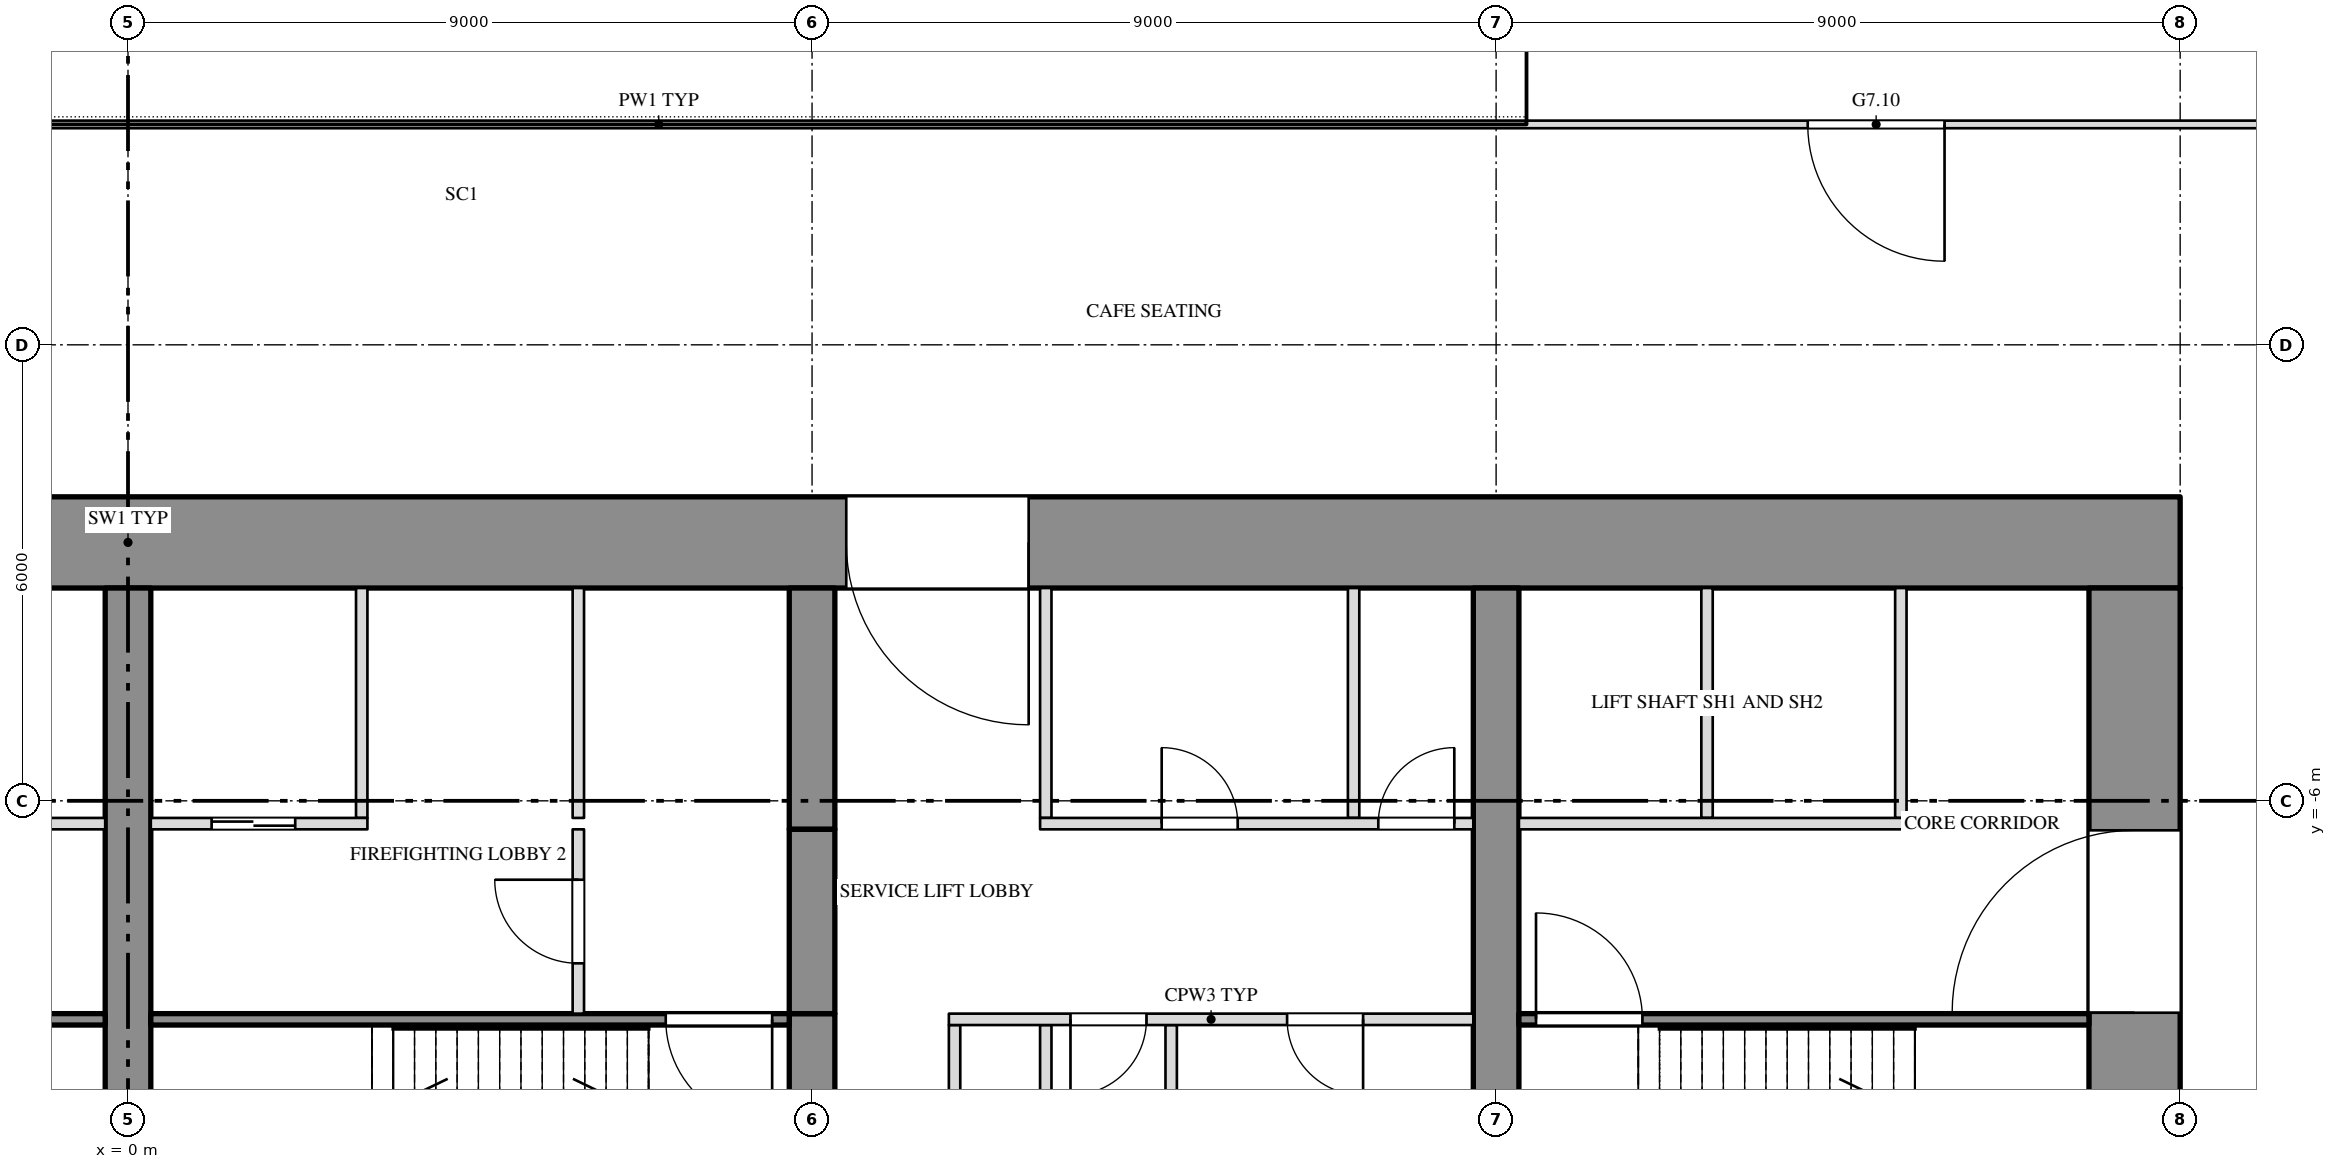
"""IFC4 building model, lengths in metres.
Left out: names, types, materials, properties, quantities, classifications, styles, units other than length and angle.
Written with IfcOpenShell. Run it as: python <this file> out.ifc"""

import sys

from ifc_helpers import new_model, si_unit, direction, frame, frame_2d, origin, place, context, subcontext, project, spatial, rectangle, extrude, element, fill, save


model = new_model("IFC4")
c1 = context("Model", 3, precision=1e-05, world=origin(), true_north=direction((0.0, 1.0)))
c2 = subcontext(c1, "Body", "Model", "MODEL_VIEW")
j1 = project(units=[si_unit("LENGTHUNIT", "METRE"), si_unit("PLANEANGLEUNIT", "RADIAN")], contexts=[c1])
p1 = place(None, origin())
s1 = spatial("IfcSite", under=j1, at=p1, CompositionType="ELEMENT")
p2 = place(p1, origin())
s2 = spatial("IfcBuilding", under=s1, at=p2, CompositionType="ELEMENT")
p3 = place(p2, frame((0.0, 0.0, 43.5)))
s3 = spatial("IfcBuildingStorey", under=s2, at=p3, CompositionType="ELEMENT", Elevation=43.5)
p4 = place(p3, frame((-27.0, -2.6, 0.0), z_axis=(0.0, 0.0, 1.0), x_axis=(1.0, 0.0, 0.0)))
e1 = element("IfcWall", 1, at=p4, inside=s3, PredefinedType="SHEAR", context=c2, shape_type="SweptSolid", body=[
    extrude(rectangle(XDim=54.0, YDim=1.2, at=frame_2d((27.0, 0.0))), origin(), (0.0, 0.0, 1.0), 4.25),
])
p5 = place(p4, frame((15.15, 0.0, 0.0)))
e2 = element("IfcOpeningElement", 2, at=p5, cuts=e1, PredefinedType="OPENING", context=c2, shape_type="SweptSolid", body=[
    extrude(rectangle(XDim=2.4, YDim=2.1, at=frame_2d((1.2, 1.05))), frame((0.0, 0.612, 0.0), z_axis=(0.0, -1.0, 0.0), x_axis=(1.0, 0.0, 0.0)), (0.0, 0.0, 1.0), 1.224),
])
p6 = place(p4, frame((36.45, 0.0, 0.0)))
e3 = element("IfcOpeningElement", 3, at=p6, cuts=e1, PredefinedType="OPENING", context=c2, shape_type="SweptSolid", body=[
    extrude(rectangle(XDim=2.4, YDim=2.1, at=frame_2d((1.2, 1.05))), frame((0.0, 0.612, 0.0), z_axis=(0.0, -1.0, 0.0), x_axis=(1.0, 0.0, 0.0)), (0.0, 0.0, 1.0), 1.224),
])
p7 = place(p3, frame((26.4, -12.8, 0.0), z_axis=(0.0, 0.0, 1.0), x_axis=(0.0, 1.0, 0.0)))
e4 = element("IfcWall", 4, at=p7, inside=s3, PredefinedType="SHEAR", context=c2, shape_type="SweptSolid", body=[
    extrude(rectangle(XDim=9.6, YDim=1.2, at=frame_2d((4.8, 0.0))), origin(), (0.0, 0.0, 1.0), 4.25),
])
p8 = place(p7, frame((4.012, 0.0, 0.0)))
e5 = element("IfcOpeningElement", 5, at=p8, cuts=e4, PredefinedType="OPENING", context=c2, shape_type="SweptSolid", body=[
    extrude(rectangle(XDim=2.4, YDim=2.1, at=frame_2d((1.2, 1.05))), frame((0.0, 0.612, 0.0), z_axis=(0.0, -1.0, 0.0), x_axis=(1.0, 0.0, 0.0)), (0.0, 0.0, 1.0), 1.224),
])
p9 = place(p3, frame((0.0, -12.8, 0.0), z_axis=(0.0, 0.0, 1.0), x_axis=(0.0, 1.0, 0.0)))
e6 = element("IfcWall", 6, at=p9, inside=s3, PredefinedType="SHEAR", context=c2, shape_type="SweptSolid", body=[
    extrude(rectangle(XDim=9.6, YDim=0.6, at=frame_2d((4.8, 0.0))), origin(), (0.0, 0.0, 1.0), 4.25),
])
p10 = place(p3, frame((9.0, -12.8, 0.0), z_axis=(0.0, 0.0, 1.0), x_axis=(0.0, 1.0, 0.0)))
e7 = element("IfcWall", 7, at=p10, inside=s3, PredefinedType="SHEAR", context=c2, shape_type="SweptSolid", body=[
    extrude(rectangle(XDim=4.0, YDim=0.6, at=frame_2d((2.0, 0.0))), origin(), (0.0, 0.0, 1.0), 4.25),
])
p11 = place(p3, frame((9.0, -6.375, 0.0), z_axis=(0.0, 0.0, 1.0), x_axis=(0.0, 1.0, 0.0)))
e8 = element("IfcWall", 8, at=p11, inside=s3, PredefinedType="SHEAR", context=c2, shape_type="SweptSolid", body=[
    extrude(rectangle(XDim=3.175, YDim=0.6, at=frame_2d((1.587, 0.0))), origin(), (0.0, 0.0, 1.0), 4.25),
])
p12 = place(p3, frame((9.0, -8.8, 3.6), z_axis=(0.0, 0.0, 1.0), x_axis=(0.0, 1.0, 0.0)))
e9 = element("IfcWall", 9, at=p12, inside=s3, PredefinedType="SHEAR", context=c2, shape_type="SweptSolid", body=[
    extrude(rectangle(XDim=2.425, YDim=0.6, at=frame_2d((1.212, 0.0))), origin(), (0.0, 0.0, 1.0), 0.65),
])
p13 = place(p3, frame((18.0, -12.8, 0.0), z_axis=(0.0, 0.0, 1.0), x_axis=(0.0, 1.0, 0.0)))
e10 = element("IfcWall", 10, at=p13, inside=s3, PredefinedType="SHEAR", context=c2, shape_type="SweptSolid", body=[
    extrude(rectangle(XDim=9.6, YDim=0.6, at=frame_2d((4.8, 0.0))), origin(), (0.0, 0.0, 1.0), 4.25),
])
p14 = place(p3, frame((-18.55, 2.9, 0.0), z_axis=(0.0, 0.0, 1.0), x_axis=(1.0, 0.0, 0.0)))
e11 = element("IfcWall", 11, at=p14, inside=s3, PredefinedType="PARTITIONING", context=c2, shape_type="SweptSolid", body=[
    extrude(rectangle(XDim=51.066, YDim=0.1, at=frame_2d((25.533, 0.0))), origin(), (0.0, 0.0, 1.0), 4.25),
])
p15 = place(p14, frame((40.65, 0.0, 0.0)))
e12 = element("IfcOpeningElement", 12, at=p15, cuts=e11, PredefinedType="OPENING", context=c2, shape_type="SweptSolid", body=[
    extrude(rectangle(XDim=1.8, YDim=2.1, at=frame_2d((0.9, 1.05))), frame((0.0, 0.062, 0.0), z_axis=(0.0, -1.0, 0.0), x_axis=(1.0, 0.0, 0.0)), (0.0, 0.0, 1.0), 0.124),
])
p16 = place(p14, frame((47.55, 0.0, 0.0)))
e13 = element("IfcOpeningElement", 13, at=p16, cuts=e11, PredefinedType="OPENING", context=c2, shape_type="SweptSolid", body=[
    extrude(rectangle(XDim=1.0, YDim=2.1, at=frame_2d((0.5, 1.05))), frame((0.0, 0.062, 0.0), z_axis=(0.0, -1.0, 0.0), x_axis=(1.0, 0.0, 0.0)), (0.0, 0.0, 1.0), 0.124),
])
for number, where, z_axis, x_axis in (
    (14, (3.075, -6.225, 0.0), (0.0, 0.0, 1.0), (0.0, 1.0, 0.0)),
    (15, (5.925, -6.225, 0.0), (0.0, 0.0, 1.0), (0.0, 1.0, 0.0)),
    (16, (12.075, -6.225, 0.0), (0.0, 0.0, 1.0), (0.0, 1.0, 0.0)),
    (17, (16.125, -6.225, 0.0), (0.0, 0.0, 1.0), (0.0, 1.0, 0.0)),
    (18, (20.775, -6.225, 0.0), (0.0, 0.0, 1.0), (0.0, 1.0, 0.0)),
    (19, (23.325, -6.225, 0.0), (0.0, 0.0, 1.0), (0.0, 1.0, 0.0)),
):
    element("IfcWall", number, at=place(p3, frame(where, z_axis=z_axis, x_axis=x_axis)), inside=s3, PredefinedType="PARTITIONING", context=c2, shape_type="SweptSolid", body=[
        extrude(rectangle(XDim=3.025, YDim=0.15, at=frame_2d((1.513, 0.0))), origin(), (0.0, 0.0, 1.0), 4.25),
    ])
p17 = place(p3, frame((10.875, -12.8, 0.0), z_axis=(0.0, 0.0, 1.0), x_axis=(0.0, 1.0, 0.0)))
e20 = element("IfcWall", 20, at=p17, inside=s3, PredefinedType="PARTITIONING", context=c2, shape_type="SweptSolid", body=[
    extrude(rectangle(XDim=3.85, YDim=0.15, at=frame_2d((1.925, 0.0))), origin(), (0.0, 0.0, 1.0), 4.25),
])
p18 = place(p17, frame((1.475, 0.0, 0.0)))
e21 = element("IfcOpeningElement", 21, at=p18, cuts=e20, PredefinedType="OPENING", context=c2, shape_type="SweptSolid", body=[
    extrude(rectangle(XDim=0.9, YDim=2.1, at=frame_2d((0.45, 1.05))), frame((0.0, 0.087, 0.0), z_axis=(0.0, -1.0, 0.0), x_axis=(1.0, 0.0, 0.0)), (0.0, 0.0, 1.0), 0.174),
])
for number, where, z_axis, x_axis in (
    (22, (12.075, -12.8, 0.0), (0.0, 0.0, 1.0), (0.0, 1.0, 0.0)),
    (23, (13.725, -12.8, 0.0), (0.0, 0.0, 1.0), (0.0, 1.0, 0.0)),
):
    element("IfcWall", number, at=place(p3, frame(where, z_axis=z_axis, x_axis=x_axis)), inside=s3, PredefinedType="PARTITIONING", context=c2, shape_type="SweptSolid", body=[
        extrude(rectangle(XDim=3.85, YDim=0.15, at=frame_2d((1.925, 0.0))), origin(), (0.0, 0.0, 1.0), 4.25),
    ])
p19 = place(p3, frame((5.925, -8.8, 0.0), z_axis=(0.0, 0.0, 1.0), x_axis=(0.0, 1.0, 0.0)))
e24 = element("IfcWall", 24, at=p19, inside=s3, PredefinedType="PARTITIONING", context=c2, shape_type="SweptSolid", body=[
    extrude(rectangle(XDim=2.425, YDim=0.15, at=frame_2d((1.212, 0.0))), origin(), (0.0, 0.0, 1.0), 4.25),
])
p20 = place(p19, frame((0.662, 0.0, 0.0)))
e25 = element("IfcOpeningElement", 25, at=p20, cuts=e24, PredefinedType="OPENING", context=c2, shape_type="SweptSolid", body=[
    extrude(rectangle(XDim=1.1, YDim=2.1, at=frame_2d((0.55, 1.05))), frame((0.0, 0.087, 0.0), z_axis=(0.0, -1.0, 0.0), x_axis=(1.0, 0.0, 0.0)), (0.0, 0.0, 1.0), 0.174),
])
p21 = place(p3, frame((-3.15, -6.3, 0.0), z_axis=(0.0, 0.0, 1.0), x_axis=(1.0, 0.0, 0.0)))
e26 = element("IfcWall", 26, at=p21, inside=s3, PredefinedType="PARTITIONING", context=c2, shape_type="SweptSolid", body=[
    extrude(rectangle(XDim=2.85, YDim=0.15, at=frame_2d((1.425, 0.0))), origin(), (0.0, 0.0, 1.0), 4.25),
])
p22 = place(p21, frame((0.95, 0.0, 0.0)))
e27 = element("IfcOpeningElement", 27, at=p22, cuts=e26, PredefinedType="OPENING", context=c2, shape_type="SweptSolid", body=[
    extrude(rectangle(XDim=1.1, YDim=2.1, at=frame_2d((0.55, 1.05))), frame((0.0, 0.087, 0.0), z_axis=(0.0, -1.0, 0.0), x_axis=(1.0, 0.0, 0.0)), (0.0, 0.0, 1.0), 0.174),
])
p23 = place(p3, frame((0.3, -6.3, 0.0), z_axis=(0.0, 0.0, 1.0), x_axis=(1.0, 0.0, 0.0)))
e28 = element("IfcWall", 28, at=p23, inside=s3, PredefinedType="PARTITIONING", context=c2, shape_type="SweptSolid", body=[
    extrude(rectangle(XDim=2.85, YDim=0.15, at=frame_2d((1.425, 0.0))), origin(), (0.0, 0.0, 1.0), 4.25),
])
p24 = place(p23, frame((0.8, 0.0, 0.0)))
e29 = element("IfcOpeningElement", 29, at=p24, cuts=e28, PredefinedType="OPENING", context=c2, shape_type="SweptSolid", body=[
    extrude(rectangle(XDim=1.1, YDim=2.1, at=frame_2d((0.55, 1.05))), frame((0.0, 0.087, 0.0), z_axis=(0.0, -1.0, 0.0), x_axis=(1.0, 0.0, 0.0)), (0.0, 0.0, 1.0), 0.174),
])
p25 = place(p3, frame((12.0, -6.3, 0.0), z_axis=(0.0, 0.0, 1.0), x_axis=(1.0, 0.0, 0.0)))
e30 = element("IfcWall", 30, at=p25, inside=s3, PredefinedType="PARTITIONING", context=c2, shape_type="SweptSolid", body=[
    extrude(rectangle(XDim=5.7, YDim=0.15, at=frame_2d((2.85, 0.0))), origin(), (0.0, 0.0, 1.0), 4.25),
])
p26 = place(p25, frame((1.6, 0.0, 0.0)))
e31 = element("IfcOpeningElement", 31, at=p26, cuts=e30, PredefinedType="OPENING", context=c2, shape_type="SweptSolid", body=[
    extrude(rectangle(XDim=1.0, YDim=2.1, at=frame_2d((0.5, 1.05))), frame((0.0, 0.087, 0.0), z_axis=(0.0, -1.0, 0.0), x_axis=(1.0, 0.0, 0.0)), (0.0, 0.0, 1.0), 0.174),
])
p27 = place(p25, frame((4.45, 0.0, 0.0)))
e32 = element("IfcOpeningElement", 32, at=p27, cuts=e30, PredefinedType="OPENING", context=c2, shape_type="SweptSolid", body=[
    extrude(rectangle(XDim=1.0, YDim=2.1, at=frame_2d((0.5, 1.05))), frame((0.0, 0.087, 0.0), z_axis=(0.0, -1.0, 0.0), x_axis=(1.0, 0.0, 0.0)), (0.0, 0.0, 1.0), 0.174),
])
p28 = place(p3, frame((18.3, -6.3, 0.0), z_axis=(0.0, 0.0, 1.0), x_axis=(1.0, 0.0, 0.0)))
e33 = element("IfcWall", 33, at=p28, inside=s3, PredefinedType="PARTITIONING", context=c2, shape_type="SweptSolid", body=[
    extrude(rectangle(XDim=5.1, YDim=0.15, at=frame_2d((2.55, 0.0))), origin(), (0.0, 0.0, 1.0), 4.25),
])
p29 = place(p3, frame((-8.7, -8.875, 0.0), z_axis=(0.0, 0.0, 1.0), x_axis=(1.0, 0.0, 0.0)))
e34 = element("IfcWall", 34, at=p29, inside=s3, PredefinedType="SHEAR", context=c2, shape_type="SweptSolid", body=[
    extrude(rectangle(XDim=8.4, YDim=0.15, at=frame_2d((4.2, 0.0))), origin(), (0.0, 0.0, 1.0), 4.25),
])
p30 = place(p29, frame((0.225, 0.0, 0.0)))
e35 = element("IfcOpeningElement", 35, at=p30, cuts=e34, PredefinedType="OPENING", context=c2, shape_type="SweptSolid", body=[
    extrude(rectangle(XDim=1.4, YDim=2.1, at=frame_2d((0.7, 1.05))), frame((0.0, 0.087, 0.0), z_axis=(0.0, -1.0, 0.0), x_axis=(1.0, 0.0, 0.0)), (0.0, 0.0, 1.0), 0.174),
])
p31 = place(p3, frame((0.3, -8.875, 0.0), z_axis=(0.0, 0.0, 1.0), x_axis=(1.0, 0.0, 0.0)))
e36 = element("IfcWall", 36, at=p31, inside=s3, PredefinedType="SHEAR", context=c2, shape_type="SweptSolid", body=[
    extrude(rectangle(XDim=8.4, YDim=0.15, at=frame_2d((4.2, 0.0))), origin(), (0.0, 0.0, 1.0), 4.25),
])
p32 = place(p31, frame((6.775, 0.0, 0.0)))
e37 = element("IfcOpeningElement", 37, at=p32, cuts=e36, PredefinedType="OPENING", context=c2, shape_type="SweptSolid", body=[
    extrude(rectangle(XDim=1.4, YDim=2.1, at=frame_2d((0.7, 1.05))), frame((0.0, 0.087, 0.0), z_axis=(0.0, -1.0, 0.0), x_axis=(1.0, 0.0, 0.0)), (0.0, 0.0, 1.0), 0.174),
])
p33 = place(p3, frame((10.8, -8.875, 0.0), z_axis=(0.0, 0.0, 1.0), x_axis=(1.0, 0.0, 0.0)))
e38 = element("IfcWall", 38, at=p33, inside=s3, PredefinedType="PARTITIONING", context=c2, shape_type="SweptSolid", body=[
    extrude(rectangle(XDim=6.9, YDim=0.15, at=frame_2d((3.45, 0.0))), origin(), (0.0, 0.0, 1.0), 4.25),
])
p34 = place(p33, frame((1.6, 0.0, 0.0)))
e39 = element("IfcOpeningElement", 39, at=p34, cuts=e38, PredefinedType="OPENING", context=c2, shape_type="SweptSolid", body=[
    extrude(rectangle(XDim=1.0, YDim=2.1, at=frame_2d((0.5, 1.05))), frame((0.0, 0.087, 0.0), z_axis=(0.0, -1.0, 0.0), x_axis=(1.0, 0.0, 0.0)), (0.0, 0.0, 1.0), 0.174),
])
p35 = place(p33, frame((4.45, 0.0, 0.0)))
e40 = element("IfcOpeningElement", 40, at=p35, cuts=e38, PredefinedType="OPENING", context=c2, shape_type="SweptSolid", body=[
    extrude(rectangle(XDim=1.0, YDim=2.1, at=frame_2d((0.5, 1.05))), frame((0.0, 0.087, 0.0), z_axis=(0.0, -1.0, 0.0), x_axis=(1.0, 0.0, 0.0)), (0.0, 0.0, 1.0), 0.174),
])
p36 = place(p3, frame((18.3, -8.875, 0.0), z_axis=(0.0, 0.0, 1.0), x_axis=(1.0, 0.0, 0.0)))
e41 = element("IfcWall", 41, at=p36, inside=s3, PredefinedType="SHEAR", context=c2, shape_type="SweptSolid", body=[
    extrude(rectangle(XDim=7.5, YDim=0.15, at=frame_2d((3.75, 0.0))), origin(), (0.0, 0.0, 1.0), 4.25),
])
p37 = place(p36, frame((0.225, 0.0, 0.0)))
e42 = element("IfcOpeningElement", 42, at=p37, cuts=e41, PredefinedType="OPENING", context=c2, shape_type="SweptSolid", body=[
    extrude(rectangle(XDim=1.4, YDim=2.1, at=frame_2d((0.7, 1.05))), frame((0.0, 0.087, 0.0), z_axis=(0.0, -1.0, 0.0), x_axis=(1.0, 0.0, 0.0)), (0.0, 0.0, 1.0), 0.174),
])
p38 = place(p15, origin())
e43 = element("IfcDoor", 43, at=p38, inside=s3, OperationType="DOUBLE_DOOR_SINGLE_SWING", PredefinedType="DOOR", context=c2, shape_type="SweptSolid", body=[
    extrude(rectangle(XDim=1.8, YDim=2.1, at=frame_2d((0.9, 1.05))), frame((0.0, 0.025, 0.0), z_axis=(0.0, -1.0, 0.0), x_axis=(1.0, 0.0, 0.0)), (0.0, 0.0, 1.0), 0.05),
])
fill(e12, e43)
p39 = place(p24, origin())
e44 = element("IfcDoor", 44, at=p39, inside=s3, OperationType="SLIDING_TO_LEFT", PredefinedType="DOOR", context=c2, shape_type="SweptSolid", body=[
    extrude(rectangle(XDim=1.1, YDim=2.1, at=frame_2d((0.55, 1.05))), frame((0.0, 0.025, 0.0), z_axis=(0.0, -1.0, 0.0), x_axis=(1.0, 0.0, 0.0)), (0.0, 0.0, 1.0), 0.05),
])
fill(e29, e44)
p40 = place(p20, origin())
e45 = element("IfcDoor", 45, at=p40, inside=s3, OperationType="SINGLE_SWING_RIGHT", PredefinedType="DOOR", context=c2, shape_type="SweptSolid", body=[
    extrude(rectangle(XDim=1.1, YDim=2.1, at=frame_2d((0.55, 1.05))), frame((0.0, 0.025, 0.0), z_axis=(0.0, -1.0, 0.0), x_axis=(1.0, 0.0, 0.0)), (0.0, 0.0, 1.0), 0.05),
])
fill(e25, e45)
p41 = place(p32, origin())
e46 = element("IfcDoor", 46, at=p41, inside=s3, OperationType="DOUBLE_DOOR_SINGLE_SWING", PredefinedType="DOOR", context=c2, shape_type="SweptSolid", body=[
    extrude(rectangle(XDim=1.4, YDim=2.1, at=frame_2d((0.7, 1.05))), frame((0.0, 0.025, 0.0), z_axis=(0.0, -1.0, 0.0), x_axis=(1.0, 0.0, 0.0)), (0.0, 0.0, 1.0), 0.05),
])
fill(e37, e46)
p42 = place(p6, origin())
e47 = element("IfcDoor", 47, at=p42, inside=s3, OperationType="DOUBLE_DOOR_SINGLE_SWING", PredefinedType="DOOR", context=c2, shape_type="SweptSolid", body=[
    extrude(rectangle(XDim=2.4, YDim=2.1, at=frame_2d((1.2, 1.05))), frame((0.0, 0.025, 0.0), z_axis=(0.0, -1.0, 0.0), x_axis=(1.0, 0.0, 0.0)), (0.0, 0.0, 1.0), 0.05),
])
fill(e3, e47)
p43 = place(p34, origin())
e48 = element("IfcDoor", 48, at=p43, inside=s3, OperationType="SINGLE_SWING_RIGHT", PredefinedType="DOOR", context=c2, shape_type="SweptSolid", body=[
    extrude(rectangle(XDim=1.0, YDim=2.1, at=frame_2d((0.5, 1.05))), frame((0.0, 0.025, 0.0), z_axis=(0.0, -1.0, 0.0), x_axis=(1.0, 0.0, 0.0)), (0.0, 0.0, 1.0), 0.05),
])
fill(e39, e48)
p44 = place(p26, origin())
e49 = element("IfcDoor", 49, at=p44, inside=s3, OperationType="SINGLE_SWING_LEFT", PredefinedType="DOOR", context=c2, shape_type="SweptSolid", body=[
    extrude(rectangle(XDim=1.0, YDim=2.1, at=frame_2d((0.5, 1.05))), frame((0.0, 0.025, 0.0), z_axis=(0.0, -1.0, 0.0), x_axis=(1.0, 0.0, 0.0)), (0.0, 0.0, 1.0), 0.05),
])
fill(e31, e49)
p45 = place(p35, origin())
e50 = element("IfcDoor", 50, at=p45, inside=s3, OperationType="SINGLE_SWING_LEFT", PredefinedType="DOOR", context=c2, shape_type="SweptSolid", body=[
    extrude(rectangle(XDim=1.0, YDim=2.1, at=frame_2d((0.5, 1.05))), frame((0.0, 0.025, 0.0), z_axis=(0.0, -1.0, 0.0), x_axis=(1.0, 0.0, 0.0)), (0.0, 0.0, 1.0), 0.05),
])
fill(e40, e50)
p46 = place(p27, origin())
e51 = element("IfcDoor", 51, at=p46, inside=s3, OperationType="SINGLE_SWING_RIGHT", PredefinedType="DOOR", context=c2, shape_type="SweptSolid", body=[
    extrude(rectangle(XDim=1.0, YDim=2.1, at=frame_2d((0.5, 1.05))), frame((0.0, 0.025, 0.0), z_axis=(0.0, -1.0, 0.0), x_axis=(1.0, 0.0, 0.0)), (0.0, 0.0, 1.0), 0.05),
])
fill(e32, e51)
p47 = place(p37, origin())
e52 = element("IfcDoor", 52, at=p47, inside=s3, OperationType="DOUBLE_DOOR_SINGLE_SWING", PredefinedType="DOOR", context=c2, shape_type="SweptSolid", body=[
    extrude(rectangle(XDim=1.4, YDim=2.1, at=frame_2d((0.7, 1.05))), frame((0.0, 0.025, 0.0), z_axis=(0.0, -1.0, 0.0), x_axis=(1.0, 0.0, 0.0)), (0.0, 0.0, 1.0), 0.05),
])
fill(e42, e52)
p48 = place(p8, origin())
e53 = element("IfcDoor", 53, at=p48, inside=s3, OperationType="DOUBLE_DOOR_SINGLE_SWING", PredefinedType="DOOR", context=c2, shape_type="SweptSolid", body=[
    extrude(rectangle(XDim=2.4, YDim=2.1, at=frame_2d((1.2, 1.05))), frame((0.0, 0.025, 0.0), z_axis=(0.0, -1.0, 0.0), x_axis=(1.0, 0.0, 0.0)), (0.0, 0.0, 1.0), 0.05),
])
fill(e5, e53)
save(model, sys.argv[1])
